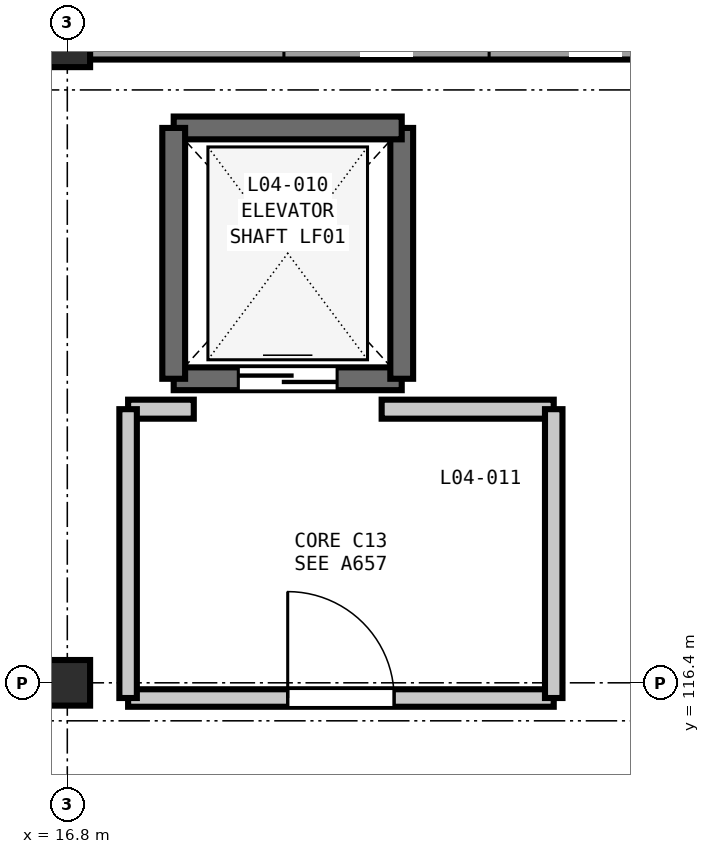
"""IFC4 building model, lengths in metres.
Left out: names, types, materials, properties, quantities, classifications, styles, units other than length and angle.
Written with IfcOpenShell. Run it as: python <this file> out.ifc"""

import sys

from ifc_helpers import new_model, si_unit, direction, frame, frame_2d, origin, origin_2d, place, context, subcontext, project, spatial, rectangle, extrude, element, fill, save


model = new_model("IFC4")
c1 = context("Model", 3, precision=1e-05, world=origin(), true_north=direction((0.0, 1.0)))
c2 = subcontext(c1, "Body", "Model", "MODEL_VIEW")
j1 = project(units=[si_unit("LENGTHUNIT", "METRE"), si_unit("PLANEANGLEUNIT", "RADIAN")], contexts=[c1])
p1 = place(None, origin())
s1 = spatial("IfcSite", under=j1, at=p1, CompositionType="ELEMENT")
p2 = place(p1, origin())
s2 = spatial("IfcBuilding", under=s1, at=p2, CompositionType="ELEMENT")
p3 = place(p2, frame((0.0, 0.0, 20.4)))
s3 = spatial("IfcBuildingStorey", under=s2, at=p3, CompositionType="ELEMENT", Elevation=20.4)
for number, where, z_axis, x_axis in (
    (1, (16.8, 116.4, 0.0), (0.0, 0.0, 1.0), (1.0, 0.0, 0.0)),
    (2, (16.8, 124.8, 0.0), (0.0, 0.0, 1.0), (1.0, 0.0, 0.0)),
):
    element("IfcColumn", number, at=place(p3, frame(where, z_axis=z_axis, x_axis=x_axis)), inside=s3, PredefinedType="COLUMN", context=c2, shape_type="SweptSolid", body=[
        extrude(rectangle(XDim=0.6, YDim=0.6, at=origin_2d()), origin(), (0.0, 0.0, 1.0), 4.2),
    ])
p4 = place(p3, frame((17.098, 124.8, 0.0), z_axis=(0.0, 0.0, 1.0), x_axis=(1.0, 0.0, 0.0)))
e3 = element("IfcWall", 3, at=p4, inside=s3, PredefinedType="SOLIDWALL", context=c2, shape_type="SweptSolid", body=[
    extrude(rectangle(XDim=7.804, YDim=0.4, at=frame_2d((3.902, 0.0))), origin(), (0.0, 0.0, 1.0), 3.48),
])
p5 = place(p4, frame((2.552, 0.0, 0.9)))
e4 = element("IfcOpeningElement", 4, at=p5, cuts=e3, PredefinedType="OPENING", context=c2, shape_type="SweptSolid", body=[
    extrude(rectangle(XDim=2.7, YDim=2.15, at=frame_2d((1.35, 1.075))), frame((0.0, 0.21, 0.0), z_axis=(0.0, -1.0, 0.0), x_axis=(1.0, 0.0, 0.0)), (0.0, 0.0, 1.0), 0.42),
])
p6 = place(p3, frame((18.2, 120.4, 0.0), z_axis=(0.0, 0.0, 1.0), x_axis=(1.0, 0.0, 0.0)))
e5 = element("IfcWall", 5, at=p6, inside=s3, PredefinedType="SHEAR", context=c2, shape_type="SweptSolid", body=[
    extrude(rectangle(XDim=3.0, YDim=0.3, at=frame_2d((1.5, 0.0))), origin(), (0.0, 0.0, 1.0), 4.2),
])
p7 = place(p6, frame((0.85, 0.0, 0.0)))
e6 = element("IfcOpeningElement", 6, at=p7, cuts=e5, PredefinedType="OPENING", context=c2, shape_type="SweptSolid", body=[
    extrude(rectangle(XDim=1.3, YDim=2.2, at=frame_2d((0.65, 1.1))), frame((0.0, 0.16, 0.0), z_axis=(0.0, -1.0, 0.0), x_axis=(1.0, 0.0, 0.0)), (0.0, 0.0, 1.0), 0.32),
])
p8 = place(p3, frame((21.2, 120.4, 0.0), z_axis=(0.0, 0.0, 1.0), x_axis=(0.0, 1.0, 0.0)))
e7 = element("IfcWall", 7, at=p8, inside=s3, PredefinedType="SHEAR", context=c2, shape_type="SweptSolid", body=[
    extrude(rectangle(XDim=3.3, YDim=0.3, at=frame_2d((1.65, 0.0))), origin(), (0.0, 0.0, 1.0), 4.2),
])
p9 = place(p3, frame((21.2, 123.7, 0.0), z_axis=(0.0, 0.0, 1.0), x_axis=(-1.0, 0.0, 0.0)))
e8 = element("IfcWall", 8, at=p9, inside=s3, PredefinedType="SHEAR", context=c2, shape_type="SweptSolid", body=[
    extrude(rectangle(XDim=3.0, YDim=0.3, at=frame_2d((1.5, 0.0))), origin(), (0.0, 0.0, 1.0), 4.2),
])
p10 = place(p3, frame((18.2, 123.7, 0.0), z_axis=(0.0, 0.0, 1.0), x_axis=(0.0, -1.0, 0.0)))
e9 = element("IfcWall", 9, at=p10, inside=s3, PredefinedType="SHEAR", context=c2, shape_type="SweptSolid", body=[
    extrude(rectangle(XDim=3.3, YDim=0.3, at=frame_2d((1.65, 0.0))), origin(), (0.0, 0.0, 1.0), 4.2),
])
p11 = place(p3, frame((17.6, 116.2, 0.0), z_axis=(0.0, 0.0, 1.0), x_axis=(1.0, 0.0, 0.0)))
e10 = element("IfcWall", 10, at=p11, inside=s3, PredefinedType="PARTITIONING", context=c2, shape_type="SweptSolid", body=[
    extrude(rectangle(XDim=5.6, YDim=0.23, at=frame_2d((2.8, 0.0))), origin(), (0.0, 0.0, 1.0), 3.585),
])
p12 = place(p11, frame((2.1, 0.0, 0.0)))
e11 = element("IfcOpeningElement", 11, at=p12, cuts=e10, PredefinedType="OPENING", context=c2, shape_type="SweptSolid", body=[
    extrude(rectangle(XDim=1.4, YDim=2.2, at=frame_2d((0.7, 1.1))), frame((0.0, 0.125, 0.0), z_axis=(0.0, -1.0, 0.0), x_axis=(1.0, 0.0, 0.0)), (0.0, 0.0, 1.0), 0.25),
])
p13 = place(p3, frame((20.936, 120.0, 0.0), z_axis=(0.0, 0.0, 1.0), x_axis=(1.0, 0.0, 0.0)))
e12 = element("IfcWall", 12, at=p13, inside=s3, PredefinedType="PARTITIONING", context=c2, shape_type="SweptSolid", body=[
    extrude(rectangle(XDim=2.264, YDim=0.25, at=frame_2d((1.132, 0.0))), origin(), (0.0, 0.0, 1.0), 3.82),
])
p14 = place(p3, frame((17.6, 120.0, 0.0), z_axis=(0.0, 0.0, 1.0), x_axis=(1.0, 0.0, 0.0)))
e13 = element("IfcWall", 13, at=p14, inside=s3, PredefinedType="PARTITIONING", context=c2, shape_type="SweptSolid", body=[
    extrude(rectangle(XDim=0.864, YDim=0.25, at=frame_2d((0.432, 0.0))), origin(), (0.0, 0.0, 1.0), 3.82),
])
for number, where, z_axis, x_axis in (
    (14, (17.6, 116.2, 0.0), (0.0, 0.0, 1.0), (0.0, 1.0, 0.0)),
    (15, (23.2, 116.2, 0.0), (0.0, 0.0, 1.0), (0.0, 1.0, 0.0)),
):
    element("IfcWall", number, at=place(p3, frame(where, z_axis=z_axis, x_axis=x_axis)), inside=s3, PredefinedType="PARTITIONING", context=c2, shape_type="SweptSolid", body=[
        extrude(rectangle(XDim=3.8, YDim=0.23, at=frame_2d((1.9, 0.0))), origin(), (0.0, 0.0, 1.0), 3.82),
    ])
p15 = place(p7, origin())
e16 = element("IfcDoor", 16, at=p15, inside=s3, OperationType="DOUBLE_DOOR_SLIDING", PredefinedType="DOOR", context=c2, shape_type="SweptSolid", body=[
    extrude(rectangle(XDim=1.3, YDim=2.2, at=frame_2d((0.65, 1.1))), frame((0.0, 0.025, 0.0), z_axis=(0.0, -1.0, 0.0), x_axis=(1.0, 0.0, 0.0)), (0.0, 0.0, 1.0), 0.05),
])
fill(e6, e16)
p16 = place(p12, origin())
e17 = element("IfcDoor", 17, at=p16, inside=s3, OperationType="SINGLE_SWING_LEFT", PredefinedType="DOOR", context=c2, shape_type="SweptSolid", body=[
    extrude(rectangle(XDim=1.4, YDim=2.2, at=frame_2d((0.7, 1.1))), frame((0.0, 0.025, 0.0), z_axis=(0.0, -1.0, 0.0), x_axis=(1.0, 0.0, 0.0)), (0.0, 0.0, 1.0), 0.05),
])
fill(e11, e17)
save(model, sys.argv[1])
